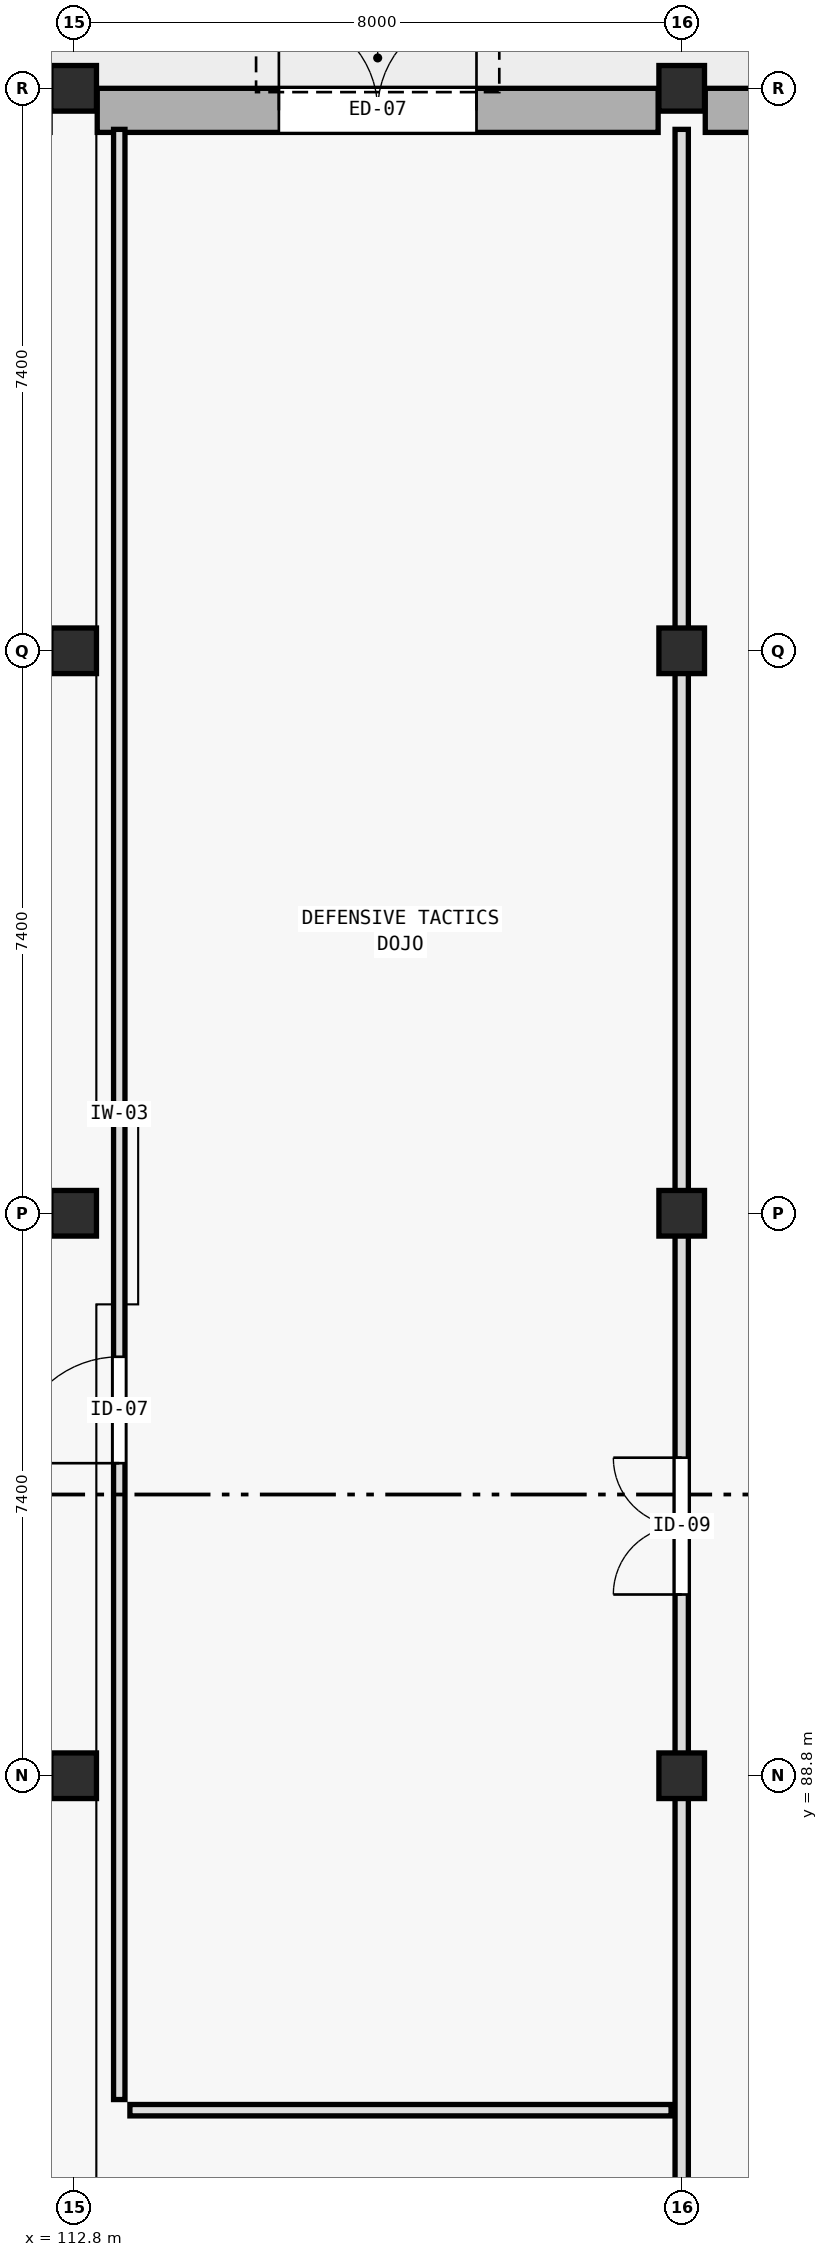
"""IFC4 building model, lengths in metres.
Left out: names, types, materials, properties, quantities, classifications, styles, units other than length and angle.
Written with IfcOpenShell. Run it as: python <this file> out.ifc"""

import sys

from ifc_helpers import new_model, si_unit, direction, frame, frame_2d, origin, origin_2d, place, context, subcontext, project, spatial, rectangle, extrude, element, fill, save


model = new_model("IFC4")
c1 = context("Model", 3, precision=1e-05, world=origin(), true_north=direction((0.0, 1.0)))
c2 = subcontext(c1, "Body", "Model", "MODEL_VIEW")
j1 = project(units=[si_unit("LENGTHUNIT", "METRE"), si_unit("PLANEANGLEUNIT", "RADIAN")], contexts=[c1])
p1 = place(None, origin())
s1 = spatial("IfcSite", under=j1, at=p1, CompositionType="ELEMENT")
p2 = place(p1, origin())
s2 = spatial("IfcBuilding", under=s1, at=p2, CompositionType="ELEMENT")
p3 = place(p2, origin())
s3 = spatial("IfcBuildingStorey", under=s2, at=p3, CompositionType="ELEMENT", Elevation=0.0)
for number, where, z_axis, x_axis in (
    (1, (112.8, 88.8, 0.0), (0.0, 0.0, 1.0), (1.0, 0.0, 0.0)),
    (2, (112.8, 96.2, 0.0), (0.0, 0.0, 1.0), (1.0, 0.0, 0.0)),
    (3, (112.8, 103.6, 0.0), (0.0, 0.0, 1.0), (1.0, 0.0, 0.0)),
    (4, (112.8, 111.0, 0.0), (0.0, 0.0, 1.0), (1.0, 0.0, 0.0)),
    (5, (120.8, 88.8, 0.0), (0.0, 0.0, 1.0), (1.0, 0.0, 0.0)),
    (6, (120.8, 96.2, 0.0), (0.0, 0.0, 1.0), (1.0, 0.0, 0.0)),
    (7, (120.8, 103.6, 0.0), (0.0, 0.0, 1.0), (1.0, 0.0, 0.0)),
    (8, (120.8, 111.0, 0.0), (0.0, 0.0, 1.0), (1.0, 0.0, 0.0)),
):
    element("IfcColumn", number, at=place(p3, frame(where, z_axis=z_axis, x_axis=x_axis)), inside=s3, PredefinedType="COLUMN", context=c2, shape_type="SweptSolid", body=[
        extrude(rectangle(XDim=0.6, YDim=0.6, at=origin_2d()), origin(), (0.0, 0.0, 1.0), 5.4),
    ])
p4 = place(p3, frame((113.11, 110.71, 0.0), z_axis=(0.0, 0.0, 1.0), x_axis=(1.0, 0.0, 0.0)))
e9 = element("IfcWall", 9, at=p4, inside=s3, PredefinedType="STANDARD", context=c2, shape_type="SweptSolid", body=[
    extrude(rectangle(XDim=7.38, YDim=0.58, at=frame_2d((3.69, 0.0))), origin(), (0.0, 0.0, 1.0), 5.14),
])
p5 = place(p4, frame((2.39, 0.0, 0.0)))
e10 = element("IfcOpeningElement", 10, at=p5, cuts=e9, PredefinedType="OPENING", context=c2, shape_type="SweptSolid", body=[
    extrude(rectangle(XDim=2.6, YDim=2.6, at=frame_2d((1.3, 1.3))), frame((0.0, 0.3, 0.0), z_axis=(0.0, -1.0, 0.0), x_axis=(1.0, 0.0, 0.0)), (0.0, 0.0, 1.0), 0.6),
])
p6 = place(p3, frame((121.11, 110.71, 0.0), z_axis=(0.0, 0.0, 1.0), x_axis=(1.0, 0.0, 0.0)))
e11 = element("IfcWall", 11, at=p6, inside=s3, PredefinedType="STANDARD", context=c2, shape_type="SweptSolid", body=[
    extrude(rectangle(XDim=7.38, YDim=0.58, at=frame_2d((3.69, 0.0))), origin(), (0.0, 0.0, 1.0), 5.4),
])
p7 = place(p6, frame((2.59, 0.0, 0.0)))
e12 = element("IfcOpeningElement", 12, at=p7, cuts=e11, PredefinedType="OPENING", context=c2, shape_type="SweptSolid", body=[
    extrude(rectangle(XDim=2.2, YDim=2.45, at=frame_2d((1.1, 1.225))), frame((0.0, 0.3, 0.0), z_axis=(0.0, -1.0, 0.0), x_axis=(1.0, 0.0, 0.0)), (0.0, 0.0, 1.0), 0.6),
])
p8 = place(p3, frame((120.8, 82.19, 0.0), z_axis=(0.0, 0.0, 1.0), x_axis=(0.0, 1.0, 0.0)))
e13 = element("IfcWall", 13, at=p8, inside=s3, PredefinedType="PARTITIONING", context=c2, shape_type="SweptSolid", body=[
    extrude(rectangle(XDim=28.27, YDim=0.175, at=frame_2d((14.135, 0.0))), origin(), (0.0, 0.0, 1.0), 4.27),
])
p9 = place(p8, frame((8.994, 0.0, 0.0)))
e14 = element("IfcOpeningElement", 14, at=p9, cuts=e13, PredefinedType="OPENING", context=c2, shape_type="SweptSolid", body=[
    extrude(rectangle(XDim=1.8, YDim=2.3, at=frame_2d((0.9, 1.15))), frame((0.0, 0.098, 0.0), z_axis=(0.0, -1.0, 0.0), x_axis=(1.0, 0.0, 0.0)), (0.0, 0.0, 1.0), 0.195),
])
p10 = place(p3, frame((113.54, 84.4, 0.0), z_axis=(0.0, 0.0, 1.0), x_axis=(1.0, 0.0, 0.0)))
e15 = element("IfcWall", 15, at=p10, inside=s3, PredefinedType="PARTITIONING", context=c2, shape_type="SweptSolid", body=[
    extrude(rectangle(XDim=7.12, YDim=0.15, at=frame_2d((3.56, 0.0))), origin(), (0.0, 0.0, 1.0), 4.27),
])
p11 = place(p3, frame((113.4, 84.54, 0.0), z_axis=(0.0, 0.0, 1.0), x_axis=(0.0, 1.0, 0.0)))
e16 = element("IfcWall", 16, at=p11, inside=s3, PredefinedType="PARTITIONING", context=c2, shape_type="SweptSolid", body=[
    extrude(rectangle(XDim=25.92, YDim=0.15, at=frame_2d((12.96, 0.0))), origin(), (0.0, 0.0, 1.0), 4.27),
])
p12 = place(p11, frame((8.372, 0.0, 0.0)))
e17 = element("IfcOpeningElement", 17, at=p12, cuts=e16, PredefinedType="OPENING", context=c2, shape_type="SweptSolid", body=[
    extrude(rectangle(XDim=1.4, YDim=2.2, at=frame_2d((0.7, 1.1))), frame((0.0, 0.085, 0.0), z_axis=(0.0, -1.0, 0.0), x_axis=(1.0, 0.0, 0.0)), (0.0, 0.0, 1.0), 0.17),
])
p13 = place(p5, origin())
e18 = element("IfcDoor", 18, at=p13, inside=s3, OperationType="DOUBLE_DOOR_SINGLE_SWING", PredefinedType="DOOR", context=c2, shape_type="SweptSolid", body=[
    extrude(rectangle(XDim=2.6, YDim=2.6, at=frame_2d((1.3, 1.3))), frame((0.0, 0.025, 0.0), z_axis=(0.0, -1.0, 0.0), x_axis=(1.0, 0.0, 0.0)), (0.0, 0.0, 1.0), 0.05),
])
fill(e10, e18)
p14 = place(p9, origin())
e19 = element("IfcDoor", 19, at=p14, inside=s3, OperationType="DOUBLE_DOOR_SINGLE_SWING", PredefinedType="DOOR", context=c2, shape_type="SweptSolid", body=[
    extrude(rectangle(XDim=1.8, YDim=2.3, at=frame_2d((0.9, 1.15))), frame((0.0, 0.025, 0.0), z_axis=(0.0, -1.0, 0.0), x_axis=(1.0, 0.0, 0.0)), (0.0, 0.0, 1.0), 0.05),
])
fill(e14, e19)
p15 = place(p12, origin())
e20 = element("IfcDoor", 20, at=p15, inside=s3, OperationType="SINGLE_SWING_LEFT", PredefinedType="DOOR", context=c2, shape_type="SweptSolid", body=[
    extrude(rectangle(XDim=1.4, YDim=2.2, at=frame_2d((0.7, 1.1))), frame((0.0, 0.025, 0.0), z_axis=(0.0, -1.0, 0.0), x_axis=(1.0, 0.0, 0.0)), (0.0, 0.0, 1.0), 0.05),
])
fill(e17, e20)
save(model, sys.argv[1])
